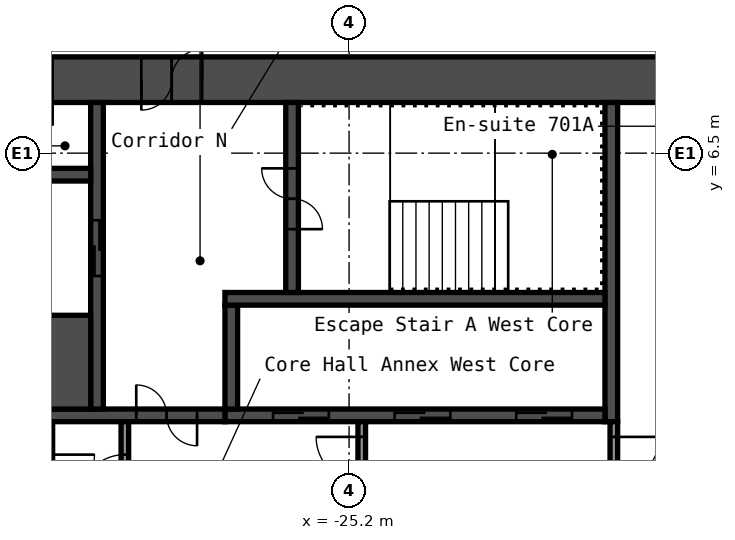
"""IFC4 building model, lengths in metres.
Left out: names, types, materials, properties, quantities, classifications, styles, units other than length and angle.
Written with IfcOpenShell. Run it as: python <this file> out.ifc"""

import sys

from ifc_helpers import new_model, si_unit, direction, frame, frame_2d, origin, place, context, subcontext, project, spatial, rectangle, extrude, element, fill, save


model = new_model("IFC4")
c1 = context("Model", 3, precision=1e-05, world=origin(), true_north=direction((0.0, 1.0)))
c2 = subcontext(c1, "Body", "Model", "MODEL_VIEW")
j1 = project(units=[si_unit("LENGTHUNIT", "METRE"), si_unit("PLANEANGLEUNIT", "RADIAN")], contexts=[c1])
p1 = place(None, origin())
s1 = spatial("IfcSite", under=j1, at=p1, CompositionType="ELEMENT")
p2 = place(p1, origin())
s2 = spatial("IfcBuilding", under=s1, at=p2, CompositionType="ELEMENT")
p3 = place(p2, frame((0.0, 0.0, 29.4)))
s3 = spatial("IfcBuildingStorey", under=s2, at=p3, CompositionType="ELEMENT", Elevation=29.4)
p4 = place(p3, frame((-32.7, 7.95, 0.0), z_axis=(0.0, 0.0, 1.0), x_axis=(1.0, 0.0, 0.0)))
e1 = element("IfcWall", 1, at=p4, inside=s3, PredefinedType="SHEAR", context=c2, shape_type="SweptSolid", body=[
    extrude(rectangle(XDim=15.0, YDim=0.9, at=frame_2d((7.5, 0.0))), origin(), (0.0, 0.0, 1.0), 2.8),
])
p5 = place(p4, frame((3.4, 0.0, 0.0)))
e2 = element("IfcOpeningElement", 2, at=p5, cuts=e1, PredefinedType="OPENING", context=c2, shape_type="SweptSolid", body=[
    extrude(rectangle(XDim=1.2, YDim=2.1, at=frame_2d((0.6, 1.05))), frame((0.0, 0.46, 0.0), z_axis=(0.0, -1.0, 0.0), x_axis=(1.0, 0.0, 0.0)), (0.0, 0.0, 1.0), 0.92),
])
p6 = place(p4, frame((0.75, 0.0, 0.0)))
e3 = element("IfcOpeningElement", 3, at=p6, cuts=e1, PredefinedType="OPENING", context=c2, shape_type="SweptSolid", body=[
    extrude(rectangle(XDim=0.9, YDim=2.1, at=frame_2d((0.45, 1.05))), frame((0.0, 0.46, 0.0), z_axis=(0.0, -1.0, 0.0), x_axis=(1.0, 0.0, 0.0)), (0.0, 0.0, 1.0), 0.92),
])
p7 = place(p3, frame((-20.025, 1.2, 0.0), z_axis=(0.0, 0.0, 1.0), x_axis=(0.0, 1.0, 0.0)))
e4 = element("IfcWall", 4, at=p7, inside=s3, PredefinedType="SHEAR", context=c2, shape_type="SweptSolid", body=[
    extrude(rectangle(XDim=6.3, YDim=0.25, at=frame_2d((3.15, 0.0))), origin(), (0.0, 0.0, 1.0), 2.8),
])
p8 = place(p3, frame((-27.65, 1.325, 0.0), z_axis=(0.0, 0.0, 1.0), x_axis=(1.0, 0.0, 0.0)))
e5 = element("IfcWall", 5, at=p8, inside=s3, PredefinedType="SHEAR", context=c2, shape_type="SweptSolid", body=[
    extrude(rectangle(XDim=7.5, YDim=0.25, at=frame_2d((3.75, 0.0))), origin(), (0.0, 0.0, 1.0), 2.8),
])
p9 = place(p8, frame((5.75, 0.0, 0.0)))
e6 = element("IfcOpeningElement", 6, at=p9, cuts=e5, PredefinedType="OPENING", context=c2, shape_type="SweptSolid", body=[
    extrude(rectangle(XDim=1.1, YDim=2.1, at=frame_2d((0.55, 1.05))), frame((0.0, 0.135, 0.0), z_axis=(0.0, -1.0, 0.0), x_axis=(1.0, 0.0, 0.0)), (0.0, 0.0, 1.0), 0.27),
])
p10 = place(p8, frame((3.35, 0.0, 0.0)))
e7 = element("IfcOpeningElement", 7, at=p10, cuts=e5, PredefinedType="OPENING", context=c2, shape_type="SweptSolid", body=[
    extrude(rectangle(XDim=1.1, YDim=2.1, at=frame_2d((0.55, 1.05))), frame((0.0, 0.135, 0.0), z_axis=(0.0, -1.0, 0.0), x_axis=(1.0, 0.0, 0.0)), (0.0, 0.0, 1.0), 0.27),
])
p11 = place(p8, frame((0.95, 0.0, 0.0)))
e8 = element("IfcOpeningElement", 8, at=p11, cuts=e5, PredefinedType="OPENING", context=c2, shape_type="SweptSolid", body=[
    extrude(rectangle(XDim=1.1, YDim=2.1, at=frame_2d((0.55, 1.05))), frame((0.0, 0.135, 0.0), z_axis=(0.0, -1.0, 0.0), x_axis=(1.0, 0.0, 0.0)), (0.0, 0.0, 1.0), 0.27),
])
p12 = place(p3, frame((-27.525, 1.45, 0.0), z_axis=(0.0, 0.0, 1.0), x_axis=(0.0, 1.0, 0.0)))
e9 = element("IfcWall", 9, at=p12, inside=s3, PredefinedType="SHEAR", context=c2, shape_type="SweptSolid", body=[
    extrude(rectangle(XDim=2.05, YDim=0.25, at=frame_2d((1.025, 0.0))), origin(), (0.0, 0.0, 1.0), 2.8),
])
p13 = place(p3, frame((-27.65, 3.625, 0.0), z_axis=(0.0, 0.0, 1.0), x_axis=(1.0, 0.0, 0.0)))
e10 = element("IfcWall", 10, at=p13, inside=s3, PredefinedType="SHEAR", context=c2, shape_type="SweptSolid", body=[
    extrude(rectangle(XDim=7.5, YDim=0.25, at=frame_2d((3.75, 0.0))), origin(), (0.0, 0.0, 1.0), 2.8),
])
p14 = place(p3, frame((-26.325, 3.75, 0.0), z_axis=(0.0, 0.0, 1.0), x_axis=(0.0, 1.0, 0.0)))
e11 = element("IfcWall", 11, at=p14, inside=s3, PredefinedType="SHEAR", context=c2, shape_type="SweptSolid", body=[
    extrude(rectangle(XDim=3.75, YDim=0.25, at=frame_2d((1.875, 0.0))), origin(), (0.0, 0.0, 1.0), 2.8),
])
p15 = place(p14, frame((1.25, 0.0, 0.0)))
e12 = element("IfcOpeningElement", 12, at=p15, cuts=e11, PredefinedType="OPENING", context=c2, shape_type="SweptSolid", body=[
    extrude(rectangle(XDim=1.2, YDim=2.1, at=frame_2d((0.6, 1.05))), frame((0.0, 0.135, 0.0), z_axis=(0.0, -1.0, 0.0), x_axis=(1.0, 0.0, 0.0)), (0.0, 0.0, 1.0), 0.27),
])
p16 = place(p3, frame((-32.7, 1.325, 0.0), z_axis=(0.0, 0.0, 1.0), x_axis=(1.0, 0.0, 0.0)))
e13 = element("IfcWall", 13, at=p16, inside=s3, PredefinedType="SHEAR", context=c2, shape_type="SweptSolid", body=[
    extrude(rectangle(XDim=5.05, YDim=0.25, at=frame_2d((2.525, 0.0))), origin(), (0.0, 0.0, 1.0), 2.8),
])
p17 = place(p16, frame((3.3, 0.0, 0.0)))
e14 = element("IfcOpeningElement", 14, at=p17, cuts=e13, PredefinedType="OPENING", context=c2, shape_type="SweptSolid", body=[
    extrude(rectangle(XDim=1.2, YDim=2.1, at=frame_2d((0.6, 1.05))), frame((0.0, 0.135, 0.0), z_axis=(0.0, -1.0, 0.0), x_axis=(1.0, 0.0, 0.0)), (0.0, 0.0, 1.0), 0.27),
])
p18 = place(p3, frame((-30.175, 1.45, 0.0), z_axis=(0.0, 0.0, 1.0), x_axis=(0.0, 1.0, 0.0)))
e15 = element("IfcWall", 15, at=p18, inside=s3, PredefinedType="SHEAR", context=c2, shape_type="SweptSolid", body=[
    extrude(rectangle(XDim=6.05, YDim=0.25, at=frame_2d((3.025, 0.0))), origin(), (0.0, 0.0, 1.0), 2.8),
])
p19 = place(p18, frame((2.625, 0.0, 0.0)))
e16 = element("IfcOpeningElement", 16, at=p19, cuts=e15, PredefinedType="OPENING", context=c2, shape_type="SweptSolid", body=[
    extrude(rectangle(XDim=1.1, YDim=2.1, at=frame_2d((0.55, 1.05))), frame((0.0, 0.135, 0.0), z_axis=(0.0, -1.0, 0.0), x_axis=(1.0, 0.0, 0.0)), (0.0, 0.0, 1.0), 0.27),
])
p20 = place(p3, frame((-32.7, 2.375, 0.0), z_axis=(0.0, 0.0, 1.0), x_axis=(1.0, 0.0, 0.0)))
e17 = element("IfcWall", 17, at=p20, inside=s3, PredefinedType="SHEAR", context=c2, shape_type="SweptSolid", body=[
    extrude(rectangle(XDim=2.4, YDim=1.85, at=frame_2d((1.2, 0.0))), origin(), (0.0, 0.0, 1.0), 2.8),
])
p21 = place(p3, frame((-32.7, 6.075, 0.0), z_axis=(0.0, 0.0, 1.0), x_axis=(1.0, 0.0, 0.0)))
e18 = element("IfcWall", 18, at=p21, inside=s3, PredefinedType="SHEAR", context=c2, shape_type="SweptSolid", body=[
    extrude(rectangle(XDim=2.4, YDim=0.25, at=frame_2d((1.2, 0.0))), origin(), (0.0, 0.0, 1.0), 2.8),
])
p22 = place(p3, frame((-19.975, -1.2, 0.0), z_axis=(0.0, 0.0, 1.0), x_axis=(0.0, 1.0, 0.0)))
e19 = element("IfcWall", 19, at=p22, inside=s3, PredefinedType="PARTITIONING", context=c2, shape_type="SweptSolid", body=[
    extrude(rectangle(XDim=2.4, YDim=0.15, at=frame_2d((1.2, 0.0))), origin(), (0.0, 0.0, 1.0), 2.8),
])
p23 = place(p22, frame((0.3, 0.0, 0.0)))
e20 = element("IfcOpeningElement", 20, at=p23, cuts=e19, PredefinedType="OPENING", context=c2, shape_type="SweptSolid", body=[
    extrude(rectangle(XDim=1.8, YDim=2.1, at=frame_2d((0.9, 1.05))), frame((0.0, 0.085, 0.0), z_axis=(0.0, -1.0, 0.0), x_axis=(1.0, 0.0, 0.0)), (0.0, 0.0, 1.0), 0.17),
])
p24 = place(p3, frame((-24.95, -1.2, 0.0), z_axis=(0.0, 0.0, 1.0), x_axis=(0.0, 1.0, 0.0)))
e21 = element("IfcWall", 21, at=p24, inside=s3, PredefinedType="PARTITIONING", context=c2, shape_type="SweptSolid", body=[
    extrude(rectangle(XDim=2.4, YDim=0.15, at=frame_2d((1.2, 0.0))), origin(), (0.0, 0.0, 1.0), 2.8),
])
p25 = place(p24, frame((0.3, 0.0, 0.0)))
e22 = element("IfcOpeningElement", 22, at=p25, cuts=e21, PredefinedType="OPENING", context=c2, shape_type="SweptSolid", body=[
    extrude(rectangle(XDim=1.8, YDim=2.1, at=frame_2d((0.9, 1.05))), frame((0.0, 0.085, 0.0), z_axis=(0.0, -1.0, 0.0), x_axis=(1.0, 0.0, 0.0)), (0.0, 0.0, 1.0), 0.17),
])
p26 = place(p3, frame((-29.625, -1.15, 0.0), z_axis=(0.0, 0.0, 1.0), x_axis=(0.0, 1.0, 0.0)))
e23 = element("IfcWall", 23, at=p26, inside=s3, PredefinedType="PARTITIONING", context=c2, shape_type="SweptSolid", body=[
    extrude(rectangle(XDim=2.35, YDim=0.15, at=frame_2d((1.175, 0.0))), origin(), (0.0, 0.0, 1.0), 2.8),
])
p27 = place(p26, frame((0.8, 0.0, 0.0)))
e24 = element("IfcOpeningElement", 24, at=p27, cuts=e23, PredefinedType="OPENING", context=c2, shape_type="SweptSolid", body=[
    extrude(rectangle(XDim=0.9, YDim=2.1, at=frame_2d((0.45, 1.05))), frame((0.0, 0.085, 0.0), z_axis=(0.0, -1.0, 0.0), x_axis=(1.0, 0.0, 0.0)), (0.0, 0.0, 1.0), 0.17),
])
p28 = place(p5, origin())
e25 = element("IfcDoor", 25, at=p28, inside=s3, OperationType="DOUBLE_DOOR_SINGLE_SWING", PredefinedType="DOOR", context=c2, shape_type="SweptSolid", body=[
    extrude(rectangle(XDim=1.2, YDim=2.1, at=frame_2d((0.6, 1.05))), frame((0.0, 0.025, 0.0), z_axis=(0.0, -1.0, 0.0), x_axis=(1.0, 0.0, 0.0)), (0.0, 0.0, 1.0), 0.05),
])
fill(e2, e25)
p29 = place(p15, origin())
e26 = element("IfcDoor", 26, at=p29, inside=s3, OperationType="DOUBLE_DOOR_SINGLE_SWING", PredefinedType="DOOR", context=c2, shape_type="SweptSolid", body=[
    extrude(rectangle(XDim=1.2, YDim=2.1, at=frame_2d((0.6, 1.05))), frame((0.0, 0.025, 0.0), z_axis=(0.0, -1.0, 0.0), x_axis=(1.0, 0.0, 0.0)), (0.0, 0.0, 1.0), 0.05),
])
fill(e12, e26)
p30 = place(p17, origin())
e27 = element("IfcDoor", 27, at=p30, inside=s3, OperationType="DOUBLE_DOOR_SINGLE_SWING", PredefinedType="DOOR", context=c2, shape_type="SweptSolid", body=[
    extrude(rectangle(XDim=1.2, YDim=2.1, at=frame_2d((0.6, 1.05))), frame((0.0, 0.025, 0.0), z_axis=(0.0, -1.0, 0.0), x_axis=(1.0, 0.0, 0.0)), (0.0, 0.0, 1.0), 0.05),
])
fill(e14, e27)
p31 = place(p23, origin())
e28 = element("IfcDoor", 28, at=p31, inside=s3, OperationType="DOUBLE_DOOR_SINGLE_SWING", PredefinedType="DOOR", context=c2, shape_type="SweptSolid", body=[
    extrude(rectangle(XDim=1.8, YDim=2.1, at=frame_2d((0.9, 1.05))), frame((0.0, 0.025, 0.0), z_axis=(0.0, -1.0, 0.0), x_axis=(1.0, 0.0, 0.0)), (0.0, 0.0, 1.0), 0.05),
])
fill(e20, e28)
p32 = place(p25, origin())
e29 = element("IfcDoor", 29, at=p32, inside=s3, OperationType="DOUBLE_DOOR_SINGLE_SWING", PredefinedType="DOOR", context=c2, shape_type="SweptSolid", body=[
    extrude(rectangle(XDim=1.8, YDim=2.1, at=frame_2d((0.9, 1.05))), frame((0.0, 0.025, 0.0), z_axis=(0.0, -1.0, 0.0), x_axis=(1.0, 0.0, 0.0)), (0.0, 0.0, 1.0), 0.05),
])
fill(e22, e29)
p33 = place(p27, origin())
e30 = element("IfcDoor", 30, at=p33, inside=s3, OperationType="SINGLE_SWING_RIGHT", PredefinedType="DOOR", context=c2, shape_type="SweptSolid", body=[
    extrude(rectangle(XDim=0.9, YDim=2.1, at=frame_2d((0.45, 1.05))), frame((0.0, 0.025, 0.0), z_axis=(0.0, -1.0, 0.0), x_axis=(1.0, 0.0, 0.0)), (0.0, 0.0, 1.0), 0.05),
])
fill(e24, e30)
p34 = place(p9, origin())
e31 = element("IfcDoor", 31, at=p34, inside=s3, OperationType="DOUBLE_DOOR_SLIDING", PredefinedType="DOOR", context=c2, shape_type="SweptSolid", body=[
    extrude(rectangle(XDim=1.1, YDim=2.1, at=frame_2d((0.55, 1.05))), frame((0.0, 0.025, 0.0), z_axis=(0.0, -1.0, 0.0), x_axis=(1.0, 0.0, 0.0)), (0.0, 0.0, 1.0), 0.05),
])
fill(e6, e31)
p35 = place(p10, origin())
e32 = element("IfcDoor", 32, at=p35, inside=s3, OperationType="DOUBLE_DOOR_SLIDING", PredefinedType="DOOR", context=c2, shape_type="SweptSolid", body=[
    extrude(rectangle(XDim=1.1, YDim=2.1, at=frame_2d((0.55, 1.05))), frame((0.0, 0.025, 0.0), z_axis=(0.0, -1.0, 0.0), x_axis=(1.0, 0.0, 0.0)), (0.0, 0.0, 1.0), 0.05),
])
fill(e7, e32)
p36 = place(p11, origin())
e33 = element("IfcDoor", 33, at=p36, inside=s3, OperationType="DOUBLE_DOOR_SLIDING", PredefinedType="DOOR", context=c2, shape_type="SweptSolid", body=[
    extrude(rectangle(XDim=1.1, YDim=2.1, at=frame_2d((0.55, 1.05))), frame((0.0, 0.025, 0.0), z_axis=(0.0, -1.0, 0.0), x_axis=(1.0, 0.0, 0.0)), (0.0, 0.0, 1.0), 0.05),
])
fill(e8, e33)
p37 = place(p19, origin())
e34 = element("IfcDoor", 34, at=p37, inside=s3, OperationType="DOUBLE_DOOR_SLIDING", PredefinedType="DOOR", context=c2, shape_type="SweptSolid", body=[
    extrude(rectangle(XDim=1.1, YDim=2.1, at=frame_2d((0.55, 1.05))), frame((0.0, 0.025, 0.0), z_axis=(0.0, -1.0, 0.0), x_axis=(1.0, 0.0, 0.0)), (0.0, 0.0, 1.0), 0.05),
])
fill(e16, e34)
save(model, sys.argv[1])
